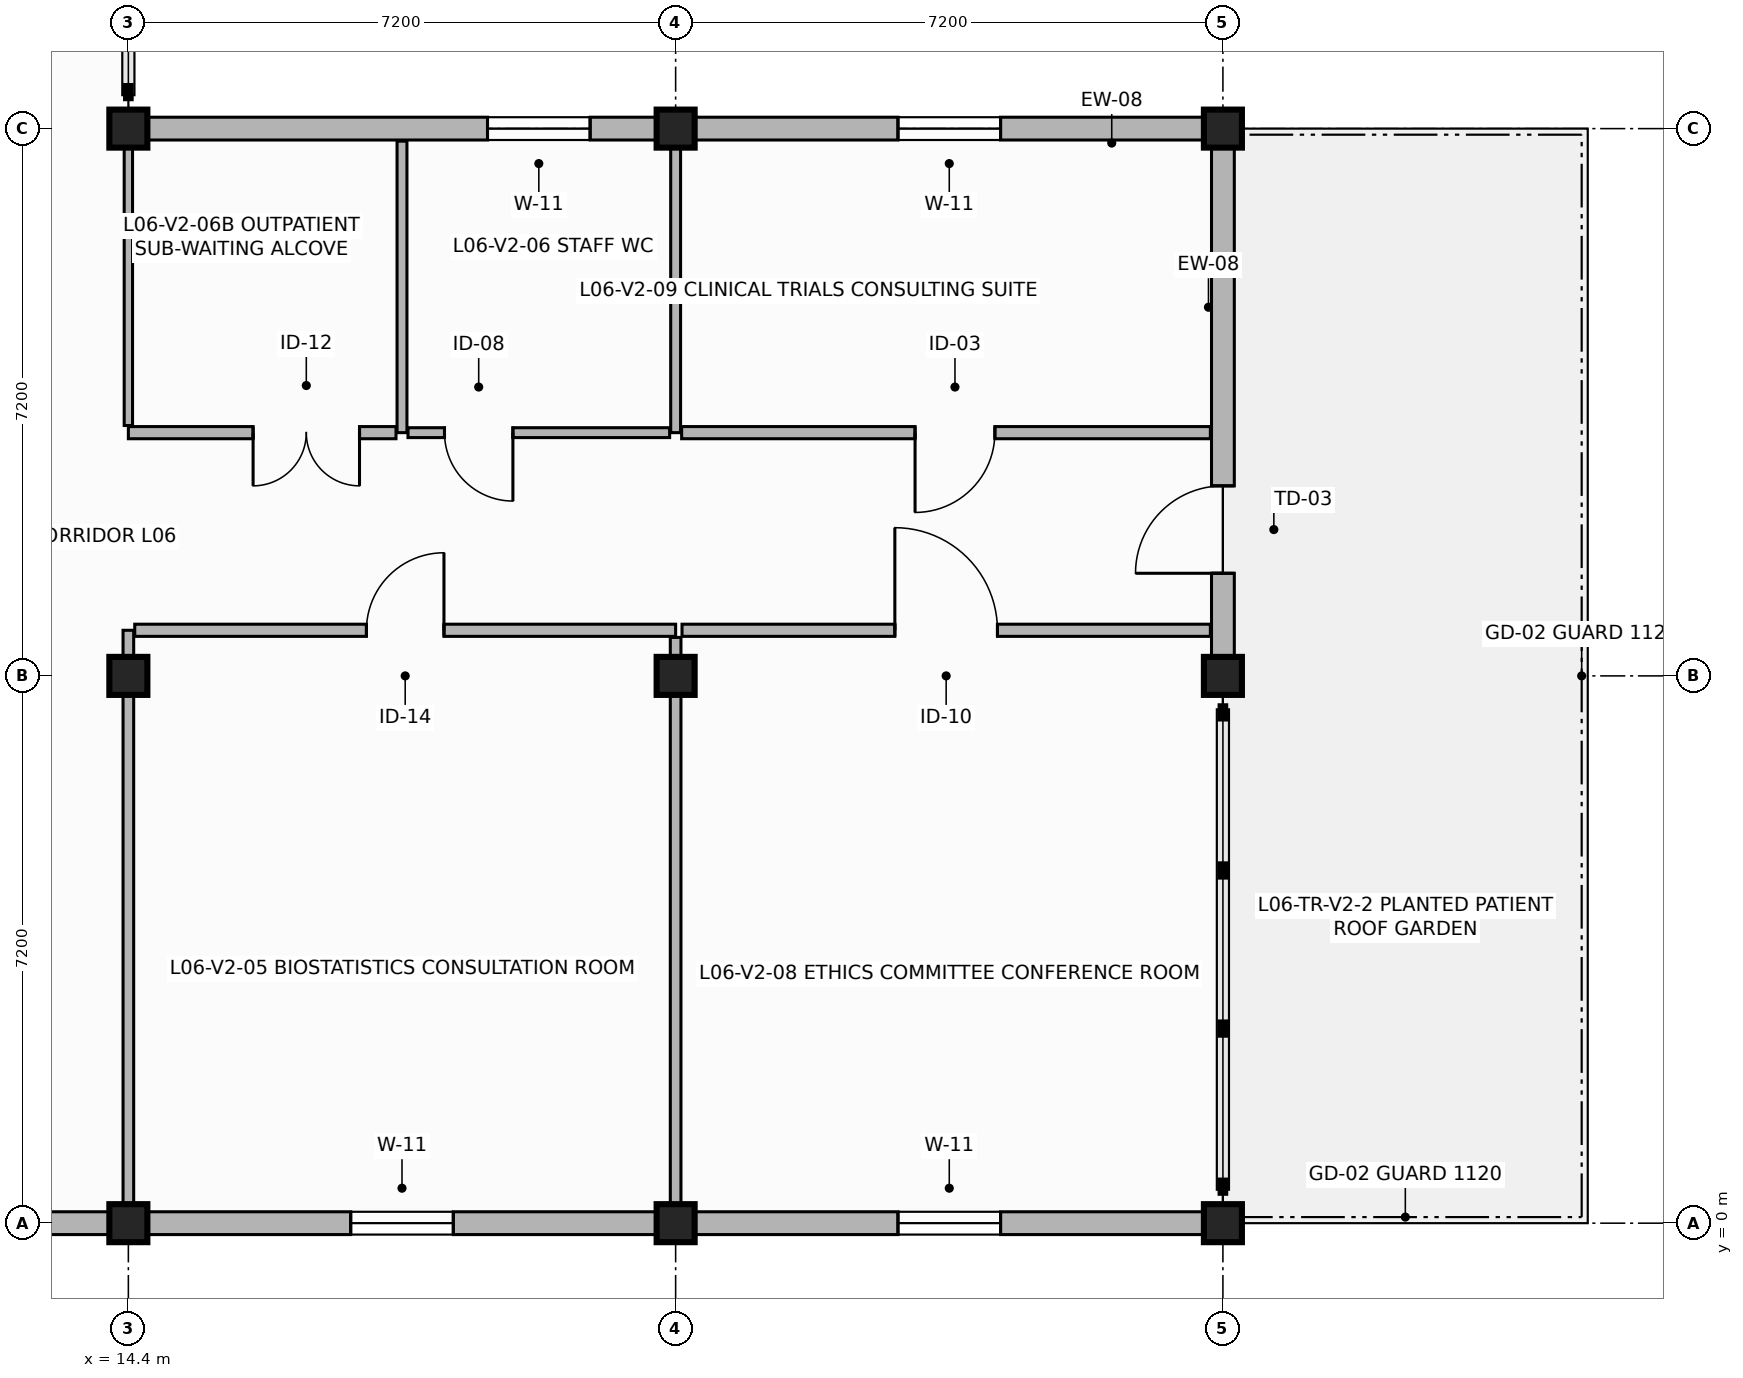
"""IFC4 building model, lengths in metres.
Left out: names, types, materials, properties, quantities, classifications, styles, units other than length and angle.
Written with IfcOpenShell. Run it as: python <this file> out.ifc"""

import sys

from ifc_helpers import new_model, si_unit, direction, frame, frame_2d, origin, origin_2d, place, context, subcontext, project, spatial, rectangle, extrude, element, fill, save


model = new_model("IFC4")
c1 = context("Model", 3, precision=1e-05, world=origin(), true_north=direction((0.0, 1.0)))
c2 = subcontext(c1, "Body", "Model", "MODEL_VIEW")
j1 = project(units=[si_unit("LENGTHUNIT", "METRE"), si_unit("PLANEANGLEUNIT", "RADIAN")], contexts=[c1])
p1 = place(None, origin())
s1 = spatial("IfcSite", under=j1, at=p1, CompositionType="ELEMENT")
p2 = place(p1, origin())
s2 = spatial("IfcBuilding", under=s1, at=p2, CompositionType="ELEMENT")
p3 = place(p2, frame((0.0, 0.0, 23.4)))
s3 = spatial("IfcBuildingStorey", under=s2, at=p3, CompositionType="ELEMENT", Elevation=23.4)
for number, where, z_axis, x_axis in (
    (1, (14.4, 0.0, 0.0), (0.0, 0.0, 1.0), (1.0, 0.0, 0.0)),
    (2, (14.4, 7.2, 0.0), (0.0, 0.0, 1.0), (1.0, 0.0, 0.0)),
    (3, (14.4, 14.4, 0.0), (0.0, 0.0, 1.0), (1.0, 0.0, 0.0)),
    (4, (21.6, 0.0, 0.0), (0.0, 0.0, 1.0), (1.0, 0.0, 0.0)),
    (5, (21.6, 7.2, 0.0), (0.0, 0.0, 1.0), (1.0, 0.0, 0.0)),
    (6, (21.6, 14.4, 0.0), (0.0, 0.0, 1.0), (1.0, 0.0, 0.0)),
    (7, (28.8, 0.0, 0.0), (0.0, 0.0, 1.0), (1.0, 0.0, 0.0)),
    (8, (28.8, 7.2, 0.0), (0.0, 0.0, 1.0), (1.0, 0.0, 0.0)),
    (9, (28.8, 14.4, 0.0), (0.0, 0.0, 1.0), (1.0, 0.0, 0.0)),
):
    element("IfcColumn", number, at=place(p3, frame(where, z_axis=z_axis, x_axis=x_axis)), inside=s3, PredefinedType="COLUMN", context=c2, shape_type="SweptSolid", body=[
        extrude(rectangle(XDim=0.5, YDim=0.5, at=origin_2d()), origin(), (0.0, 0.0, 1.0), 3.36),
    ])
p4 = place(p3, frame((7.2, 0.0, 0.0), z_axis=(0.0, 0.0, 1.0), x_axis=(1.0, 0.0, 0.0)))
e10 = element("IfcWall", 10, at=p4, inside=s3, PredefinedType="SOLIDWALL", context=c2, shape_type="SweptSolid", body=[
    extrude(rectangle(XDim=7.2, YDim=0.3, at=frame_2d((3.6, 0.0))), origin(), (0.0, 0.0, 1.0), 2.69),
])
p5 = place(p4, frame((2.925, 0.0, 0.85)))
e11 = element("IfcOpeningElement", 11, at=p5, cuts=e10, PredefinedType="OPENING", context=c2, shape_type="SweptSolid", body=[
    extrude(rectangle(XDim=1.35, YDim=1.6, at=frame_2d((0.675, 0.8))), frame((0.0, 0.16, 0.0), z_axis=(0.0, -1.0, 0.0), x_axis=(1.0, 0.0, 0.0)), (0.0, 0.0, 1.0), 0.32),
])
p6 = place(p3, frame((14.4, 0.0, 0.0), z_axis=(0.0, 0.0, 1.0), x_axis=(1.0, 0.0, 0.0)))
e12 = element("IfcWall", 12, at=p6, inside=s3, PredefinedType="SOLIDWALL", context=c2, shape_type="SweptSolid", body=[
    extrude(rectangle(XDim=7.2, YDim=0.3, at=frame_2d((3.6, 0.0))), origin(), (0.0, 0.0, 1.0), 2.69),
])
p7 = place(p6, frame((2.925, 0.0, 0.85)))
e13 = element("IfcOpeningElement", 13, at=p7, cuts=e12, PredefinedType="OPENING", context=c2, shape_type="SweptSolid", body=[
    extrude(rectangle(XDim=1.35, YDim=1.6, at=frame_2d((0.675, 0.8))), frame((0.0, 0.16, 0.0), z_axis=(0.0, -1.0, 0.0), x_axis=(1.0, 0.0, 0.0)), (0.0, 0.0, 1.0), 0.32),
])
p8 = place(p3, frame((21.6, 0.0, 0.0), z_axis=(0.0, 0.0, 1.0), x_axis=(1.0, 0.0, 0.0)))
e14 = element("IfcWall", 14, at=p8, inside=s3, PredefinedType="SOLIDWALL", context=c2, shape_type="SweptSolid", body=[
    extrude(rectangle(XDim=7.2, YDim=0.3, at=frame_2d((3.6, 0.0))), origin(), (0.0, 0.0, 1.0), 2.69),
])
p9 = place(p8, frame((2.925, 0.0, 0.85)))
e15 = element("IfcOpeningElement", 15, at=p9, cuts=e14, PredefinedType="OPENING", context=c2, shape_type="SweptSolid", body=[
    extrude(rectangle(XDim=1.35, YDim=1.6, at=frame_2d((0.675, 0.8))), frame((0.0, 0.16, 0.0), z_axis=(0.0, -1.0, 0.0), x_axis=(1.0, 0.0, 0.0)), (0.0, 0.0, 1.0), 0.32),
])
p10 = place(p3, frame((28.8, 7.2, 0.0), z_axis=(0.0, 0.0, 1.0), x_axis=(0.0, 1.0, 0.0)))
e16 = element("IfcWall", 16, at=p10, inside=s3, PredefinedType="SOLIDWALL", context=c2, shape_type="SweptSolid", body=[
    extrude(rectangle(XDim=7.2, YDim=0.3, at=frame_2d((3.6, 0.0))), origin(), (0.0, 0.0, 1.0), 2.69),
])
p11 = place(p10, frame((1.35, 0.0, 0.0)))
e17 = element("IfcOpeningElement", 17, at=p11, cuts=e16, PredefinedType="OPENING", context=c2, shape_type="SweptSolid", body=[
    extrude(rectangle(XDim=1.15, YDim=2.2, at=frame_2d((0.575, 1.1))), frame((0.0, 0.16, 0.0), z_axis=(0.0, -1.0, 0.0), x_axis=(1.0, 0.0, 0.0)), (0.0, 0.0, 1.0), 0.32),
])
p12 = place(p3, frame((28.8, 14.4, 0.0), z_axis=(0.0, 0.0, 1.0), x_axis=(-1.0, 0.0, 0.0)))
e18 = element("IfcWall", 18, at=p12, inside=s3, PredefinedType="SOLIDWALL", context=c2, shape_type="SweptSolid", body=[
    extrude(rectangle(XDim=7.2, YDim=0.3, at=frame_2d((3.6, 0.0))), origin(), (0.0, 0.0, 1.0), 2.69),
])
p13 = place(p12, frame((2.925, 0.0, 0.85)))
e19 = element("IfcOpeningElement", 19, at=p13, cuts=e18, PredefinedType="OPENING", context=c2, shape_type="SweptSolid", body=[
    extrude(rectangle(XDim=1.35, YDim=1.6, at=frame_2d((0.675, 0.8))), frame((0.0, 0.16, 0.0), z_axis=(0.0, -1.0, 0.0), x_axis=(1.0, 0.0, 0.0)), (0.0, 0.0, 1.0), 0.32),
])
p14 = place(p3, frame((21.6, 14.4, 0.0), z_axis=(0.0, 0.0, 1.0), x_axis=(-1.0, 0.0, 0.0)))
e20 = element("IfcWall", 20, at=p14, inside=s3, PredefinedType="SOLIDWALL", context=c2, shape_type="SweptSolid", body=[
    extrude(rectangle(XDim=7.2, YDim=0.3, at=frame_2d((3.6, 0.0))), origin(), (0.0, 0.0, 1.0), 2.69),
])
p15 = place(p14, frame((1.125, 0.0, 0.85)))
e21 = element("IfcOpeningElement", 21, at=p15, cuts=e20, PredefinedType="OPENING", context=c2, shape_type="SweptSolid", body=[
    extrude(rectangle(XDim=1.35, YDim=1.6, at=frame_2d((0.675, 0.8))), frame((0.0, 0.16, 0.0), z_axis=(0.0, -1.0, 0.0), x_axis=(1.0, 0.0, 0.0)), (0.0, 0.0, 1.0), 0.32),
])
p16 = place(p3, frame((14.4, 0.165, 0.0), z_axis=(0.0, 0.0, 1.0), x_axis=(0.0, 1.0, 0.0)))
e22 = element("IfcWall", 22, at=p16, inside=s3, PredefinedType="PARTITIONING", context=c2, shape_type="SweptSolid", body=[
    extrude(rectangle(XDim=7.635, YDim=0.14, at=frame_2d((3.817, 0.0))), origin(), (0.0, 0.0, 1.0), 2.68),
])
p17 = place(p3, frame((14.484, 7.8, 0.0), z_axis=(0.0, 0.0, 1.0), x_axis=(1.0, 0.0, 0.0)))
e23 = element("IfcWall", 23, at=p17, inside=s3, PredefinedType="PARTITIONING", context=c2, shape_type="SweptSolid", body=[
    extrude(rectangle(XDim=7.116, YDim=0.16, at=frame_2d((3.558, 0.0))), origin(), (0.0, 0.0, 1.0), 2.68),
])
p18 = place(p17, frame((3.048, 0.0, 0.0)))
e24 = element("IfcOpeningElement", 24, at=p18, cuts=e23, PredefinedType="OPENING", context=c2, shape_type="SweptSolid", body=[
    extrude(rectangle(XDim=1.02, YDim=2.15, at=frame_2d((0.51, 1.075))), frame((0.0, 0.09, 0.0), z_axis=(0.0, -1.0, 0.0), x_axis=(1.0, 0.0, 0.0)), (0.0, 0.0, 1.0), 0.18),
])
p19 = place(p3, frame((21.6, 7.706, 0.0), z_axis=(0.0, 0.0, 1.0), x_axis=(0.0, -1.0, 0.0)))
e25 = element("IfcWall", 25, at=p19, inside=s3, PredefinedType="PARTITIONING", context=c2, shape_type="SweptSolid", body=[
    extrude(rectangle(XDim=7.541, YDim=0.14, at=frame_2d((3.771, 0.0))), origin(), (0.0, 0.0, 1.0), 2.68),
])
for number, where, z_axis, x_axis in (
    (26, (18.0, 10.4, 0.0), (0.0, 0.0, 1.0), (0.0, 1.0, 0.0)),
    (27, (21.6, 14.235, 0.0), (0.0, 0.0, 1.0), (0.0, -1.0, 0.0)),
):
    element("IfcWall", number, at=place(p3, frame(where, z_axis=z_axis, x_axis=x_axis)), inside=s3, PredefinedType="PARTITIONING", context=c2, shape_type="SweptSolid", body=[
        extrude(rectangle(XDim=3.835, YDim=0.13, at=frame_2d((1.917, 0.0))), origin(), (0.0, 0.0, 1.0), 2.68),
    ])
p20 = place(p3, frame((21.521, 10.4, 0.0), z_axis=(0.0, 0.0, 1.0), x_axis=(-1.0, 0.0, 0.0)))
e28 = element("IfcWall", 28, at=p20, inside=s3, PredefinedType="PARTITIONING", context=c2, shape_type="SweptSolid", body=[
    extrude(rectangle(XDim=3.442, YDim=0.13, at=frame_2d((1.721, 0.0))), origin(), (0.0, 0.0, 1.0), 2.68),
])
p21 = place(p20, frame((2.062, 0.0, 0.0)))
e29 = element("IfcOpeningElement", 29, at=p21, cuts=e28, PredefinedType="OPENING", context=c2, shape_type="SweptSolid", body=[
    extrude(rectangle(XDim=0.9, YDim=2.1, at=frame_2d((0.45, 1.05))), frame((0.0, 0.075, 0.0), z_axis=(0.0, -1.0, 0.0), x_axis=(1.0, 0.0, 0.0)), (0.0, 0.0, 1.0), 0.15),
])
p22 = place(p3, frame((17.921, 10.4, 0.0), z_axis=(0.0, 0.0, 1.0), x_axis=(-1.0, 0.0, 0.0)))
e30 = element("IfcWall", 30, at=p22, inside=s3, PredefinedType="PARTITIONING", context=c2, shape_type="SweptSolid", body=[
    extrude(rectangle(XDim=3.521, YDim=0.16, at=frame_2d((1.76, 0.0))), origin(), (0.0, 0.0, 1.0), 2.68),
])
p23 = place(p22, frame((0.48, 0.0, 0.0)))
e31 = element("IfcOpeningElement", 31, at=p23, cuts=e30, PredefinedType="OPENING", context=c2, shape_type="SweptSolid", body=[
    extrude(rectangle(XDim=1.4, YDim=2.3, at=frame_2d((0.7, 1.15))), frame((0.0, 0.09, 0.0), z_axis=(0.0, -1.0, 0.0), x_axis=(1.0, 0.0, 0.0)), (0.0, 0.0, 1.0), 0.18),
])
p24 = place(p3, frame((14.4, 10.494, 0.0), z_axis=(0.0, 0.0, 1.0), x_axis=(0.0, 1.0, 0.0)))
e32 = element("IfcWall", 32, at=p24, inside=s3, PredefinedType="PARTITIONING", context=c2, shape_type="SweptSolid", body=[
    extrude(rectangle(XDim=3.741, YDim=0.11, at=frame_2d((1.871, 0.0))), origin(), (0.0, 0.0, 1.0), 2.68),
])
p25 = place(p3, frame((21.684, 7.8, 0.0), z_axis=(0.0, 0.0, 1.0), x_axis=(1.0, 0.0, 0.0)))
e33 = element("IfcWall", 33, at=p25, inside=s3, PredefinedType="PARTITIONING", context=c2, shape_type="SweptSolid", body=[
    extrude(rectangle(XDim=6.951, YDim=0.16, at=frame_2d((3.476, 0.0))), origin(), (0.0, 0.0, 1.0), 2.68),
])
p26 = place(p25, frame((2.8, 0.0, 0.0)))
e34 = element("IfcOpeningElement", 34, at=p26, cuts=e33, PredefinedType="OPENING", context=c2, shape_type="SweptSolid", body=[
    extrude(rectangle(XDim=1.35, YDim=2.25, at=frame_2d((0.675, 1.125))), frame((0.0, 0.09, 0.0), z_axis=(0.0, -1.0, 0.0), x_axis=(1.0, 0.0, 0.0)), (0.0, 0.0, 1.0), 0.18),
])
p27 = place(p3, frame((28.635, 10.4, 0.0), z_axis=(0.0, 0.0, 1.0), x_axis=(-1.0, 0.0, 0.0)))
e35 = element("IfcWall", 35, at=p27, inside=s3, PredefinedType="PARTITIONING", context=c2, shape_type="SweptSolid", body=[
    extrude(rectangle(XDim=6.956, YDim=0.16, at=frame_2d((3.478, 0.0))), origin(), (0.0, 0.0, 1.0), 2.68),
])
p28 = place(p27, frame((2.835, 0.0, 0.0)))
e36 = element("IfcOpeningElement", 36, at=p28, cuts=e35, PredefinedType="OPENING", context=c2, shape_type="SweptSolid", body=[
    extrude(rectangle(XDim=1.05, YDim=2.15, at=frame_2d((0.525, 1.075))), frame((0.0, 0.09, 0.0), z_axis=(0.0, -1.0, 0.0), x_axis=(1.0, 0.0, 0.0)), (0.0, 0.0, 1.0), 0.18),
])
p29 = place(p7, origin())
e37 = element("IfcWindow", 37, at=p29, inside=s3, PartitioningType="SINGLE_PANEL", PredefinedType="WINDOW", context=c2, shape_type="SweptSolid", body=[
    extrude(rectangle(XDim=1.35, YDim=1.6, at=frame_2d((0.675, 0.8))), frame((0.0, 0.03, 0.0), z_axis=(0.0, -1.0, 0.0), x_axis=(1.0, 0.0, 0.0)), (0.0, 0.0, 1.0), 0.06),
])
fill(e13, e37)
p30 = place(p9, origin())
e38 = element("IfcWindow", 38, at=p30, inside=s3, PartitioningType="SINGLE_PANEL", PredefinedType="WINDOW", context=c2, shape_type="SweptSolid", body=[
    extrude(rectangle(XDim=1.35, YDim=1.6, at=frame_2d((0.675, 0.8))), frame((0.0, 0.03, 0.0), z_axis=(0.0, -1.0, 0.0), x_axis=(1.0, 0.0, 0.0)), (0.0, 0.0, 1.0), 0.06),
])
fill(e15, e38)
p31 = place(p11, origin())
e39 = element("IfcDoor", 39, at=p31, inside=s3, OperationType="SINGLE_SWING_LEFT", PredefinedType="DOOR", context=c2, shape_type="SweptSolid", body=[
    extrude(rectangle(XDim=1.15, YDim=2.2, at=frame_2d((0.575, 1.1))), frame((0.0, 0.025, 0.0), z_axis=(0.0, -1.0, 0.0), x_axis=(1.0, 0.0, 0.0)), (0.0, 0.0, 1.0), 0.05),
])
fill(e17, e39)
p32 = place(p13, origin())
e40 = element("IfcWindow", 40, at=p32, inside=s3, PartitioningType="SINGLE_PANEL", PredefinedType="WINDOW", context=c2, shape_type="SweptSolid", body=[
    extrude(rectangle(XDim=1.35, YDim=1.6, at=frame_2d((0.675, 0.8))), frame((0.0, 0.03, 0.0), z_axis=(0.0, -1.0, 0.0), x_axis=(1.0, 0.0, 0.0)), (0.0, 0.0, 1.0), 0.06),
])
fill(e19, e40)
p33 = place(p15, origin())
e41 = element("IfcWindow", 41, at=p33, inside=s3, PartitioningType="SINGLE_PANEL", PredefinedType="WINDOW", context=c2, shape_type="SweptSolid", body=[
    extrude(rectangle(XDim=1.35, YDim=1.6, at=frame_2d((0.675, 0.8))), frame((0.0, 0.03, 0.0), z_axis=(0.0, -1.0, 0.0), x_axis=(1.0, 0.0, 0.0)), (0.0, 0.0, 1.0), 0.06),
])
fill(e21, e41)
p34 = place(p18, origin())
e42 = element("IfcDoor", 42, at=p34, inside=s3, OperationType="SINGLE_SWING_RIGHT", PredefinedType="DOOR", context=c2, shape_type="SweptSolid", body=[
    extrude(rectangle(XDim=1.02, YDim=2.15, at=frame_2d((0.51, 1.075))), frame((0.0, 0.025, 0.0), z_axis=(0.0, -1.0, 0.0), x_axis=(1.0, 0.0, 0.0)), (0.0, 0.0, 1.0), 0.05),
])
fill(e24, e42)
p35 = place(p21, origin())
e43 = element("IfcDoor", 43, at=p35, inside=s3, OperationType="SINGLE_SWING_LEFT", PredefinedType="DOOR", context=c2, shape_type="SweptSolid", body=[
    extrude(rectangle(XDim=0.9, YDim=2.1, at=frame_2d((0.45, 1.05))), frame((0.0, 0.025, 0.0), z_axis=(0.0, -1.0, 0.0), x_axis=(1.0, 0.0, 0.0)), (0.0, 0.0, 1.0), 0.05),
])
fill(e29, e43)
p36 = place(p23, origin())
e44 = element("IfcDoor", 44, at=p36, inside=s3, OperationType="DOUBLE_DOOR_SINGLE_SWING", PredefinedType="DOOR", context=c2, shape_type="SweptSolid", body=[
    extrude(rectangle(XDim=1.4, YDim=2.3, at=frame_2d((0.7, 1.15))), frame((0.0, 0.025, 0.0), z_axis=(0.0, -1.0, 0.0), x_axis=(1.0, 0.0, 0.0)), (0.0, 0.0, 1.0), 0.05),
])
fill(e31, e44)
p37 = place(p26, origin())
e45 = element("IfcDoor", 45, at=p37, inside=s3, OperationType="SINGLE_SWING_LEFT", PredefinedType="DOOR", context=c2, shape_type="SweptSolid", body=[
    extrude(rectangle(XDim=1.35, YDim=2.25, at=frame_2d((0.675, 1.125))), frame((0.0, 0.025, 0.0), z_axis=(0.0, -1.0, 0.0), x_axis=(1.0, 0.0, 0.0)), (0.0, 0.0, 1.0), 0.05),
])
fill(e34, e45)
p38 = place(p28, origin())
e46 = element("IfcDoor", 46, at=p38, inside=s3, OperationType="SINGLE_SWING_RIGHT", PredefinedType="DOOR", context=c2, shape_type="SweptSolid", body=[
    extrude(rectangle(XDim=1.05, YDim=2.15, at=frame_2d((0.525, 1.075))), frame((0.0, 0.025, 0.0), z_axis=(0.0, -1.0, 0.0), x_axis=(1.0, 0.0, 0.0)), (0.0, 0.0, 1.0), 0.05),
])
fill(e36, e46)
save(model, sys.argv[1])
